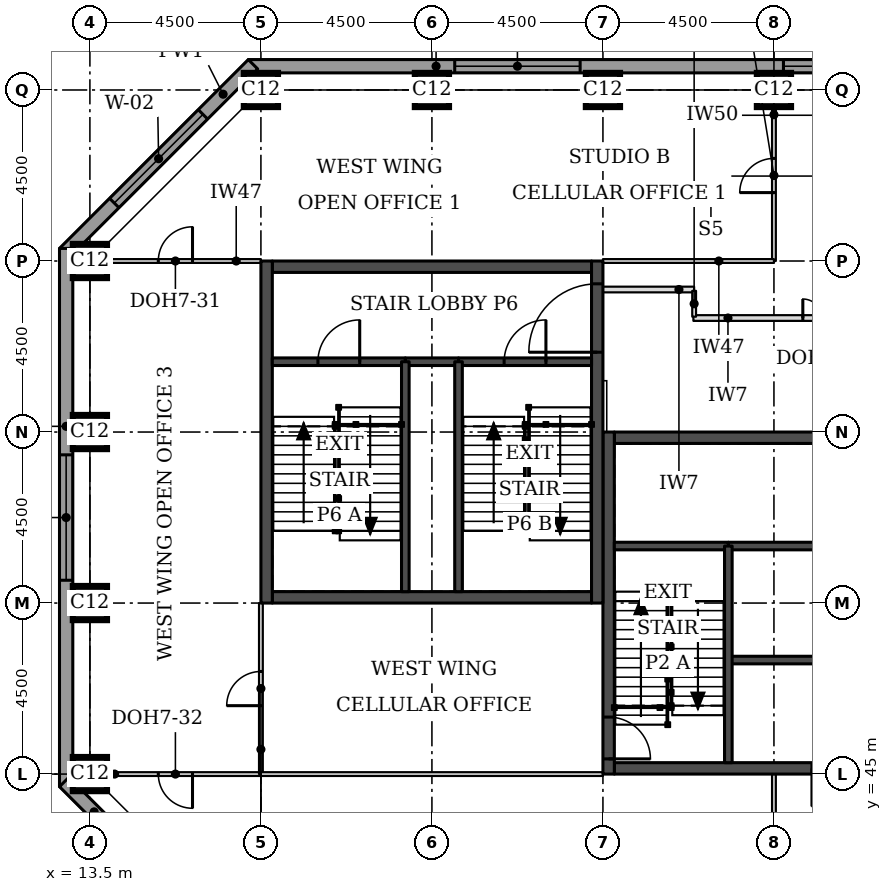
"""IFC4 building model, lengths in metres.
Left out: names, types, materials, properties, quantities, classifications, styles, units other than length and angle.
Written with IfcOpenShell. Run it as: python <this file> out.ifc"""

import sys

from ifc_helpers import new_model, si_unit, direction, frame, frame_2d, origin, origin_2d, place, context, subcontext, project, spatial, rectangle, extrude, element, fill, save


model = new_model("IFC4")
c1 = context("Model", 3, precision=1e-05, world=origin(), true_north=direction((0.0, 1.0)))
c2 = subcontext(c1, "Body", "Model", "MODEL_VIEW")
j1 = project(units=[si_unit("LENGTHUNIT", "METRE"), si_unit("PLANEANGLEUNIT", "RADIAN")], contexts=[c1])
p1 = place(None, origin())
s1 = spatial("IfcSite", under=j1, at=p1, CompositionType="ELEMENT")
p2 = place(p1, origin())
s2 = spatial("IfcBuilding", under=s1, at=p2, CompositionType="ELEMENT")
p3 = place(p2, frame((0.0, 0.0, 192.1)))
s3 = spatial("IfcBuildingStorey", under=s2, at=p3, CompositionType="ELEMENT", Elevation=192.1)
for number, where, z_axis, x_axis in (
    (1, (13.5, 45.0, 0.0), (0.0, 0.0, 1.0), (1.0, 0.0, 0.0)),
    (2, (13.5, 49.5, 0.0), (0.0, 0.0, 1.0), (1.0, 0.0, 0.0)),
    (3, (13.5, 54.0, 0.0), (0.0, 0.0, 1.0), (1.0, 0.0, 0.0)),
    (4, (13.5, 58.5, 0.0), (0.0, 0.0, 1.0), (1.0, 0.0, 0.0)),
    (5, (18.0, 63.0, 0.0), (0.0, 0.0, 1.0), (1.0, 0.0, 0.0)),
    (6, (22.5, 63.0, 0.0), (0.0, 0.0, 1.0), (1.0, 0.0, 0.0)),
    (7, (27.0, 63.0, 0.0), (0.0, 0.0, 1.0), (1.0, 0.0, 0.0)),
    (8, (31.5, 63.0, 0.0), (0.0, 0.0, 1.0), (1.0, 0.0, 0.0)),
):
    element("IfcColumn", number, at=place(p3, frame(where, z_axis=z_axis, x_axis=x_axis)), inside=s3, PredefinedType="COLUMN", context=c2, shape_type="SweptSolid", body=[
        extrude(rectangle(XDim=0.9, YDim=0.9, at=origin_2d()), origin(), (0.0, 0.0, 1.0), 3.7),
    ])
p4 = place(p3, frame((27.3, 45.15, 0.0), z_axis=(0.0, 0.0, 1.0), x_axis=(1.0, 0.0, 0.0)))
e9 = element("IfcWall", 9, at=p4, inside=s3, PredefinedType="SHEAR", context=c2, shape_type="SweptSolid", body=[
    extrude(rectangle(XDim=8.4, YDim=0.3, at=frame_2d((4.2, 0.0))), origin(), (0.0, 0.0, 1.0), 3.7),
])
p5 = place(p4, frame((5.2, 0.0, 0.0)))
e10 = element("IfcOpeningElement", 10, at=p5, cuts=e9, PredefinedType="OPENING", context=c2, shape_type="SweptSolid", body=[
    extrude(rectangle(XDim=1.0, YDim=2.1, at=frame_2d((0.5, 1.05))), frame((0.0, 0.16, 0.0), z_axis=(0.0, -1.0, 0.0), x_axis=(1.0, 0.0, 0.0)), (0.0, 0.0, 1.0), 0.32),
])
p6 = place(p3, frame((27.3, 53.85, 0.0), z_axis=(0.0, 0.0, 1.0), x_axis=(1.0, 0.0, 0.0)))
e11 = element("IfcWall", 11, at=p6, inside=s3, PredefinedType="SHEAR", context=c2, shape_type="SweptSolid", body=[
    extrude(rectangle(XDim=8.4, YDim=0.3, at=frame_2d((4.2, 0.0))), origin(), (0.0, 0.0, 1.0), 3.7),
])
p7 = place(p6, frame((6.4, 0.0, 0.0)))
e12 = element("IfcOpeningElement", 12, at=p7, cuts=e11, PredefinedType="OPENING", context=c2, shape_type="SweptSolid", body=[
    extrude(rectangle(XDim=1.1, YDim=2.1, at=frame_2d((0.55, 1.05))), frame((0.0, 0.16, 0.0), z_axis=(0.0, -1.0, 0.0), x_axis=(1.0, 0.0, 0.0)), (0.0, 0.0, 1.0), 0.32),
])
p8 = place(p3, frame((27.15, 45.0, 0.0), z_axis=(0.0, 0.0, 1.0), x_axis=(0.0, 1.0, 0.0)))
e13 = element("IfcWall", 13, at=p8, inside=s3, PredefinedType="SHEAR", context=c2, shape_type="SweptSolid", body=[
    extrude(rectangle(XDim=9.0, YDim=0.3, at=frame_2d((4.5, 0.0))), origin(), (0.0, 0.0, 1.0), 3.7),
])
p9 = place(p8, frame((0.4, 0.0, 0.0)))
e14 = element("IfcOpeningElement", 14, at=p9, cuts=e13, PredefinedType="OPENING", context=c2, shape_type="SweptSolid", body=[
    extrude(rectangle(XDim=1.1, YDim=2.1, at=frame_2d((0.55, 1.05))), frame((0.0, 0.16, 0.0), z_axis=(0.0, -1.0, 0.0), x_axis=(1.0, 0.0, 0.0)), (0.0, 0.0, 1.0), 0.32),
])
for number, where, z_axis, x_axis in (
    (15, (18.3, 49.65, 0.0), (0.0, 0.0, 1.0), (1.0, 0.0, 0.0)),
    (16, (18.3, 58.35, 0.0), (0.0, 0.0, 1.0), (1.0, 0.0, 0.0)),
):
    element("IfcWall", number, at=place(p3, frame(where, z_axis=z_axis, x_axis=x_axis)), inside=s3, PredefinedType="SHEAR", context=c2, shape_type="SweptSolid", body=[
        extrude(rectangle(XDim=8.4, YDim=0.3, at=frame_2d((4.2, 0.0))), origin(), (0.0, 0.0, 1.0), 3.7),
    ])
p10 = place(p3, frame((18.15, 49.5, 0.0), z_axis=(0.0, 0.0, 1.0), x_axis=(0.0, 1.0, 0.0)))
e17 = element("IfcWall", 17, at=p10, inside=s3, PredefinedType="SHEAR", context=c2, shape_type="SweptSolid", body=[
    extrude(rectangle(XDim=9.0, YDim=0.3, at=frame_2d((4.5, 0.0))), origin(), (0.0, 0.0, 1.0), 3.7),
])
p11 = place(p3, frame((26.85, 49.5, 0.0), z_axis=(0.0, 0.0, 1.0), x_axis=(0.0, 1.0, 0.0)))
e18 = element("IfcWall", 18, at=p11, inside=s3, PredefinedType="SHEAR", context=c2, shape_type="SweptSolid", body=[
    extrude(rectangle(XDim=9.0, YDim=0.3, at=frame_2d((4.5, 0.0))), origin(), (0.0, 0.0, 1.0), 3.7),
])
p12 = place(p11, frame((6.6, 0.0, 0.0)))
e19 = element("IfcOpeningElement", 19, at=p12, cuts=e18, PredefinedType="OPENING", context=c2, shape_type="SweptSolid", body=[
    extrude(rectangle(XDim=1.8, YDim=2.1, at=frame_2d((0.9, 1.05))), frame((0.0, 0.16, 0.0), z_axis=(0.0, -1.0, 0.0), x_axis=(1.0, 0.0, 0.0)), (0.0, 0.0, 1.0), 0.32),
])
p13 = place(p3, frame((35.55, 63.625, 0.0), z_axis=(0.0, 0.0, 1.0), x_axis=(-1.0, 0.0, 0.0)))
e20 = element("IfcWall", 20, at=p13, inside=s3, PredefinedType="STANDARD", context=c2, shape_type="SweptSolid", body=[
    extrude(rectangle(XDim=17.881, YDim=0.35, at=frame_2d((8.941, 0.0))), origin(), (0.0, 0.0, 1.0), 3.525),
])
p14 = place(p13, frame((0.5, 0.0, 0.9)))
e21 = element("IfcOpeningElement", 21, at=p14, cuts=e20, PredefinedType="OPENING", context=c2, shape_type="SweptSolid", body=[
    extrude(rectangle(XDim=3.3, YDim=1.9, at=frame_2d((1.65, 0.95))), frame((0.0, 0.185, 0.0), z_axis=(0.0, -1.0, 0.0), x_axis=(1.0, 0.0, 0.0)), (0.0, 0.0, 1.0), 0.37),
])
p15 = place(p13, frame((9.15, 0.0, 0.9)))
e22 = element("IfcOpeningElement", 22, at=p15, cuts=e20, PredefinedType="OPENING", context=c2, shape_type="SweptSolid", body=[
    extrude(rectangle(XDim=3.3, YDim=1.9, at=frame_2d((1.65, 0.95))), frame((0.0, 0.185, 0.0), z_axis=(0.0, -1.0, 0.0), x_axis=(1.0, 0.0, 0.0)), (0.0, 0.0, 1.0), 0.37),
])
p16 = place(p3, frame((17.792, 63.676, 0.0), z_axis=(0.0, 0.0, 1.0), x_axis=(-0.707106781187, -0.707106781187, 0.0)))
e23 = element("IfcWall", 23, at=p16, inside=s3, PredefinedType="STANDARD", context=c2, shape_type="SweptSolid", body=[
    extrude(rectangle(XDim=7.027, YDim=0.35, at=frame_2d((3.513, 0.0))), origin(), (0.0, 0.0, 1.0), 3.525),
])
p17 = place(p16, frame((1.863, 0.0, 0.9)))
e24 = element("IfcOpeningElement", 24, at=p17, cuts=e23, PredefinedType="OPENING", context=c2, shape_type="SweptSolid", body=[
    extrude(rectangle(XDim=3.3, YDim=1.9, at=frame_2d((1.65, 0.95))), frame((0.0, 0.185, 0.0), z_axis=(0.0, -1.0, 0.0), x_axis=(1.0, 0.0, 0.0)), (0.0, 0.0, 1.0), 0.37),
])
p18 = place(p3, frame((12.875, 58.831, 0.0), z_axis=(0.0, 0.0, 1.0), x_axis=(0.0, -1.0, 0.0)))
e25 = element("IfcWall", 25, at=p18, inside=s3, PredefinedType="STANDARD", context=c2, shape_type="SweptSolid", body=[
    extrude(rectangle(XDim=14.163, YDim=0.35, at=frame_2d((7.081, 0.0))), origin(), (0.0, 0.0, 1.0), 3.525),
])
p19 = place(p18, frame((5.431, 0.0, 0.9)))
e26 = element("IfcOpeningElement", 26, at=p19, cuts=e25, PredefinedType="OPENING", context=c2, shape_type="SweptSolid", body=[
    extrude(rectangle(XDim=3.3, YDim=1.9, at=frame_2d((1.65, 0.95))), frame((0.0, 0.185, 0.0), z_axis=(0.0, -1.0, 0.0), x_axis=(1.0, 0.0, 0.0)), (0.0, 0.0, 1.0), 0.37),
])
p20 = place(p3, frame((12.824, 44.792, 0.0), z_axis=(0.0, 0.0, 1.0), x_axis=(0.707106781187, -0.707106781187, 0.0)))
e27 = element("IfcWall", 27, at=p20, inside=s3, PredefinedType="STANDARD", context=c2, shape_type="SweptSolid", body=[
    extrude(rectangle(XDim=7.027, YDim=0.35, at=frame_2d((3.513, 0.0))), origin(), (0.0, 0.0, 1.0), 3.525),
])
p21 = place(p20, frame((1.863, 0.0, 0.9)))
e28 = element("IfcOpeningElement", 28, at=p21, cuts=e27, PredefinedType="OPENING", context=c2, shape_type="SweptSolid", body=[
    extrude(rectangle(XDim=3.3, YDim=1.9, at=frame_2d((1.65, 0.95))), frame((0.0, 0.185, 0.0), z_axis=(0.0, -1.0, 0.0), x_axis=(1.0, 0.0, 0.0)), (0.0, 0.0, 1.0), 0.37),
])
p22 = place(p3, frame((29.38, 57.0, 0.0), z_axis=(0.0, 0.0, 1.0), x_axis=(1.0, 0.0, 0.0)))
e29 = element("IfcWall", 29, at=p22, inside=s3, PredefinedType="PARTITIONING", context=c2, shape_type="SweptSolid", body=[
    extrude(rectangle(XDim=6.62, YDim=0.15, at=frame_2d((3.31, 0.0))), origin(), (0.0, 0.0, 1.0), 3.55),
])
p23 = place(p22, frame((2.88, 0.0, 0.0)))
e30 = element("IfcOpeningElement", 30, at=p23, cuts=e29, PredefinedType="OPENING", context=c2, shape_type="SweptSolid", body=[
    extrude(rectangle(XDim=1.0, YDim=2.1, at=frame_2d((0.5, 1.05))), frame((0.0, 0.085, 0.0), z_axis=(0.0, -1.0, 0.0), x_axis=(1.0, 0.0, 0.0)), (0.0, 0.0, 1.0), 0.17),
])
p24 = place(p3, frame((31.5, 63.0, 0.0), z_axis=(0.0, 0.0, 1.0), x_axis=(0.0, -1.0, 0.0)))
e31 = element("IfcWall", 31, at=p24, inside=s3, PredefinedType="PARTITIONING", context=c2, shape_type="SweptSolid", body=[
    extrude(rectangle(XDim=4.5, YDim=0.1, at=frame_2d((2.25, 0.0))), origin(), (0.0, 0.0, 1.0), 3.55),
])
p25 = place(p24, frame((1.8, 0.0, 0.0)))
e32 = element("IfcOpeningElement", 32, at=p25, cuts=e31, PredefinedType="OPENING", context=c2, shape_type="SweptSolid", body=[
    extrude(rectangle(XDim=0.9, YDim=2.1, at=frame_2d((0.45, 1.05))), frame((0.0, 0.06, 0.0), z_axis=(0.0, -1.0, 0.0), x_axis=(1.0, 0.0, 0.0)), (0.0, 0.0, 1.0), 0.12),
])
p26 = place(p3, frame((31.5, 58.5, 0.0), z_axis=(0.0, 0.0, 1.0), x_axis=(-1.0, 0.0, 0.0)))
e33 = element("IfcWall", 33, at=p26, inside=s3, PredefinedType="PARTITIONING", context=c2, shape_type="SweptSolid", body=[
    extrude(rectangle(XDim=4.5, YDim=0.1, at=frame_2d((2.25, 0.0))), origin(), (0.0, 0.0, 1.0), 2.55),
])
p27 = place(p3, frame((13.5, 58.5, 0.0), z_axis=(0.0, 0.0, 1.0), x_axis=(1.0, 0.0, 0.0)))
e34 = element("IfcWall", 34, at=p27, inside=s3, PredefinedType="PARTITIONING", context=c2, shape_type="SweptSolid", body=[
    extrude(rectangle(XDim=4.5, YDim=0.1, at=frame_2d((2.25, 0.0))), origin(), (0.0, 0.0, 1.0), 2.55),
])
p28 = place(p27, frame((1.8, 0.0, 0.0)))
e35 = element("IfcOpeningElement", 35, at=p28, cuts=e34, PredefinedType="OPENING", context=c2, shape_type="SweptSolid", body=[
    extrude(rectangle(XDim=0.9, YDim=2.1, at=frame_2d((0.45, 1.05))), frame((0.0, 0.06, 0.0), z_axis=(0.0, -1.0, 0.0), x_axis=(1.0, 0.0, 0.0)), (0.0, 0.0, 1.0), 0.12),
])
p29 = place(p3, frame((18.0, 45.0, 0.0), z_axis=(0.0, 0.0, 1.0), x_axis=(-1.0, 0.0, 0.0)))
e36 = element("IfcWall", 36, at=p29, inside=s3, PredefinedType="PARTITIONING", context=c2, shape_type="SweptSolid", body=[
    extrude(rectangle(XDim=4.5, YDim=0.1, at=frame_2d((2.25, 0.0))), origin(), (0.0, 0.0, 1.0), 2.55),
])
p30 = place(p29, frame((1.8, 0.0, 0.0)))
e37 = element("IfcOpeningElement", 37, at=p30, cuts=e36, PredefinedType="OPENING", context=c2, shape_type="SweptSolid", body=[
    extrude(rectangle(XDim=0.9, YDim=2.1, at=frame_2d((0.45, 1.05))), frame((0.0, 0.06, 0.0), z_axis=(0.0, -1.0, 0.0), x_axis=(1.0, 0.0, 0.0)), (0.0, 0.0, 1.0), 0.12),
])
p31 = place(p3, frame((18.0, 49.5, 0.0), z_axis=(0.0, 0.0, 1.0), x_axis=(0.0, -1.0, 0.0)))
e38 = element("IfcWall", 38, at=p31, inside=s3, PredefinedType="PARTITIONING", context=c2, shape_type="SweptSolid", body=[
    extrude(rectangle(XDim=4.5, YDim=0.1, at=frame_2d((2.25, 0.0))), origin(), (0.0, 0.0, 1.0), 3.55),
])
p32 = place(p31, frame((1.8, 0.0, 0.0)))
e39 = element("IfcOpeningElement", 39, at=p32, cuts=e38, PredefinedType="OPENING", context=c2, shape_type="SweptSolid", body=[
    extrude(rectangle(XDim=0.9, YDim=2.1, at=frame_2d((0.45, 1.05))), frame((0.0, 0.06, 0.0), z_axis=(0.0, -1.0, 0.0), x_axis=(1.0, 0.0, 0.0)), (0.0, 0.0, 1.0), 0.12),
])
p33 = place(p3, frame((18.0, 45.0, 0.0), z_axis=(0.0, 0.0, 1.0), x_axis=(1.0, 0.0, 0.0)))
e40 = element("IfcWall", 40, at=p33, inside=s3, PredefinedType="PARTITIONING", context=c2, shape_type="SweptSolid", body=[
    extrude(rectangle(XDim=9.0, YDim=0.1, at=frame_2d((4.5, 0.0))), origin(), (0.0, 0.0, 1.0), 2.55),
])
p34 = place(p3, frame((31.5, 45.0, 0.0), z_axis=(0.0, 0.0, 1.0), x_axis=(0.0, -1.0, 0.0)))
e41 = element("IfcWall", 41, at=p34, inside=s3, PredefinedType="PARTITIONING", context=c2, shape_type="SweptSolid", body=[
    extrude(rectangle(XDim=4.5, YDim=0.1, at=frame_2d((2.25, 0.0))), origin(), (0.0, 0.0, 1.0), 3.55),
])
p35 = place(p34, frame((1.8, 0.0, 0.0)))
e42 = element("IfcOpeningElement", 42, at=p35, cuts=e41, PredefinedType="OPENING", context=c2, shape_type="SweptSolid", body=[
    extrude(rectangle(XDim=0.9, YDim=2.1, at=frame_2d((0.45, 1.05))), frame((0.0, 0.06, 0.0), z_axis=(0.0, -1.0, 0.0), x_axis=(1.0, 0.0, 0.0)), (0.0, 0.0, 1.0), 0.12),
])
p36 = place(p3, frame((27.0, 57.75, 0.0), z_axis=(0.0, 0.0, 1.0), x_axis=(1.0, 0.0, 0.0)))
e43 = element("IfcWall", 43, at=p36, inside=s3, PredefinedType="PARTITIONING", context=c2, shape_type="SweptSolid", body=[
    extrude(rectangle(XDim=2.4, YDim=0.15, at=frame_2d((1.2, 0.0))), origin(), (0.0, 0.0, 1.0), 3.55),
])
p37 = place(p3, frame((29.4, 57.715, 0.0), z_axis=(0.0, 0.0, 1.0), x_axis=(0.0, -1.0, 0.0)))
e44 = element("IfcWall", 44, at=p37, inside=s3, PredefinedType="PARTITIONING", context=c2, shape_type="SweptSolid", body=[
    extrude(rectangle(XDim=0.68, YDim=0.1, at=frame_2d((0.34, 0.0))), origin(), (0.0, 0.0, 1.0), 3.55),
])
p38 = place(p3, frame((30.3, 48.0, 0.0), z_axis=(0.0, 0.0, 1.0), x_axis=(1.0, 0.0, 0.0)))
e45 = element("IfcWall", 45, at=p38, inside=s3, PredefinedType="SOLIDWALL", context=c2, shape_type="SweptSolid", body=[
    extrude(rectangle(XDim=2.4, YDim=0.2, at=frame_2d((1.2, 0.0))), origin(), (0.0, 0.0, 1.0), 3.55),
])
p39 = place(p3, frame((30.3, 51.0, 0.0), z_axis=(0.0, 0.0, 1.0), x_axis=(1.0, 0.0, 0.0)))
e46 = element("IfcWall", 46, at=p39, inside=s3, PredefinedType="SOLIDWALL", context=c2, shape_type="SweptSolid", body=[
    extrude(rectangle(XDim=2.4, YDim=0.2, at=frame_2d((1.2, 0.0))), origin(), (0.0, 0.0, 1.0), 3.7),
])
p40 = place(p3, frame((27.3, 51.0, 0.0), z_axis=(0.0, 0.0, 1.0), x_axis=(1.0, 0.0, 0.0)))
e47 = element("IfcWall", 47, at=p40, inside=s3, PredefinedType="SOLIDWALL", context=c2, shape_type="SweptSolid", body=[
    extrude(rectangle(XDim=3.0, YDim=0.2, at=frame_2d((1.5, 0.0))), origin(), (0.0, 0.0, 1.0), 3.55),
])
p41 = place(p3, frame((30.3, 45.3, 0.0), z_axis=(0.0, 0.0, 1.0), x_axis=(0.0, 1.0, 0.0)))
e48 = element("IfcWall", 48, at=p41, inside=s3, PredefinedType="SOLIDWALL", context=c2, shape_type="SweptSolid", body=[
    extrude(rectangle(XDim=5.7, YDim=0.2, at=frame_2d((2.85, 0.0))), origin(), (0.0, 0.0, 1.0), 3.55),
])
p42 = place(p3, frame((21.8, 55.85, 0.0), z_axis=(0.0, 0.0, 1.0), x_axis=(1.0, 0.0, 0.0)))
e49 = element("IfcWall", 49, at=p42, inside=s3, PredefinedType="SOLIDWALL", context=c2, shape_type="SweptSolid", body=[
    extrude(rectangle(XDim=1.4, YDim=0.2, at=frame_2d((0.7, 0.0))), origin(), (0.0, 0.0, 1.0), 3.55),
])
p43 = place(p3, frame((18.3, 55.85, 0.0), z_axis=(0.0, 0.0, 1.0), x_axis=(1.0, 0.0, 0.0)))
e50 = element("IfcWall", 50, at=p43, inside=s3, PredefinedType="SOLIDWALL", context=c2, shape_type="SweptSolid", body=[
    extrude(rectangle(XDim=3.5, YDim=0.2, at=frame_2d((1.75, 0.0))), origin(), (0.0, 0.0, 1.0), 3.55),
])
p44 = place(p43, frame((1.2, 0.0, 0.0)))
e51 = element("IfcOpeningElement", 51, at=p44, cuts=e50, PredefinedType="OPENING", context=c2, shape_type="SweptSolid", body=[
    extrude(rectangle(XDim=1.1, YDim=2.1, at=frame_2d((0.55, 1.05))), frame((0.0, 0.11, 0.0), z_axis=(0.0, -1.0, 0.0), x_axis=(1.0, 0.0, 0.0)), (0.0, 0.0, 1.0), 0.22),
])
p45 = place(p3, frame((23.2, 55.85, 0.0), z_axis=(0.0, 0.0, 1.0), x_axis=(1.0, 0.0, 0.0)))
e52 = element("IfcWall", 52, at=p45, inside=s3, PredefinedType="SOLIDWALL", context=c2, shape_type="SweptSolid", body=[
    extrude(rectangle(XDim=3.5, YDim=0.2, at=frame_2d((1.75, 0.0))), origin(), (0.0, 0.0, 1.0), 3.55),
])
p46 = place(p45, frame((1.2, 0.0, 0.0)))
e53 = element("IfcOpeningElement", 53, at=p46, cuts=e52, PredefinedType="OPENING", context=c2, shape_type="SweptSolid", body=[
    extrude(rectangle(XDim=1.1, YDim=2.1, at=frame_2d((0.55, 1.05))), frame((0.0, 0.11, 0.0), z_axis=(0.0, -1.0, 0.0), x_axis=(1.0, 0.0, 0.0)), (0.0, 0.0, 1.0), 0.22),
])
for number, where, z_axis, x_axis in (
    (54, (21.8, 49.8, 0.0), (0.0, 0.0, 1.0), (0.0, 1.0, 0.0)),
    (55, (23.2, 49.8, 0.0), (0.0, 0.0, 1.0), (0.0, 1.0, 0.0)),
):
    element("IfcWall", number, at=place(p3, frame(where, z_axis=z_axis, x_axis=x_axis)), inside=s3, PredefinedType="SOLIDWALL", context=c2, shape_type="SweptSolid", body=[
        extrude(rectangle(XDim=6.05, YDim=0.2, at=frame_2d((3.025, 0.0))), origin(), (0.0, 0.0, 1.0), 3.55),
    ])
p47 = place(p14, origin())
e56 = element("IfcWindow", 56, at=p47, inside=s3, PartitioningType="SINGLE_PANEL", PredefinedType="WINDOW", context=c2, shape_type="SweptSolid", body=[
    extrude(rectangle(XDim=3.3, YDim=1.9, at=frame_2d((1.65, 0.95))), frame((0.0, 0.085, 0.0), z_axis=(0.0, -1.0, 0.0), x_axis=(1.0, 0.0, 0.0)), (0.0, 0.0, 1.0), 0.06),
])
fill(e21, e56)
p48 = place(p15, origin())
e57 = element("IfcWindow", 57, at=p48, inside=s3, PartitioningType="SINGLE_PANEL", PredefinedType="WINDOW", context=c2, shape_type="SweptSolid", body=[
    extrude(rectangle(XDim=3.3, YDim=1.9, at=frame_2d((1.65, 0.95))), frame((0.0, 0.085, 0.0), z_axis=(0.0, -1.0, 0.0), x_axis=(1.0, 0.0, 0.0)), (0.0, 0.0, 1.0), 0.06),
])
fill(e22, e57)
p49 = place(p17, origin())
e58 = element("IfcWindow", 58, at=p49, inside=s3, PartitioningType="SINGLE_PANEL", PredefinedType="WINDOW", context=c2, shape_type="SweptSolid", body=[
    extrude(rectangle(XDim=3.3, YDim=1.9, at=frame_2d((1.65, 0.95))), frame((0.0, 0.085, 0.0), z_axis=(0.0, -1.0, 0.0), x_axis=(1.0, 0.0, 0.0)), (0.0, 0.0, 1.0), 0.06),
])
fill(e24, e58)
p50 = place(p19, origin())
e59 = element("IfcWindow", 59, at=p50, inside=s3, PartitioningType="SINGLE_PANEL", PredefinedType="WINDOW", context=c2, shape_type="SweptSolid", body=[
    extrude(rectangle(XDim=3.3, YDim=1.9, at=frame_2d((1.65, 0.95))), frame((0.0, 0.085, 0.0), z_axis=(0.0, -1.0, 0.0), x_axis=(1.0, 0.0, 0.0)), (0.0, 0.0, 1.0), 0.06),
])
fill(e26, e59)
p51 = place(p23, origin())
e60 = element("IfcDoor", 60, at=p51, inside=s3, OperationType="DOUBLE_DOOR_SINGLE_SWING", PredefinedType="DOOR", context=c2, shape_type="SweptSolid", body=[
    extrude(rectangle(XDim=1.0, YDim=2.1, at=frame_2d((0.5, 1.05))), frame((0.0, 0.025, 0.0), z_axis=(0.0, -1.0, 0.0), x_axis=(1.0, 0.0, 0.0)), (0.0, 0.0, 1.0), 0.05),
])
fill(e30, e60)
p52 = place(p25, frame((0.9, 0.0, 0.0), z_axis=(0.0, 0.0, 1.0), x_axis=(-1.0, 0.0, 0.0)))
e61 = element("IfcDoor", 61, at=p52, inside=s3, OperationType="SINGLE_SWING_LEFT", PredefinedType="DOOR", context=c2, shape_type="SweptSolid", body=[
    extrude(rectangle(XDim=0.9, YDim=2.1, at=frame_2d((0.45, 1.05))), frame((0.0, 0.025, 0.0), z_axis=(0.0, -1.0, 0.0), x_axis=(1.0, 0.0, 0.0)), (0.0, 0.0, 1.0), 0.05),
])
fill(e32, e61)
p53 = place(p28, origin())
e62 = element("IfcDoor", 62, at=p53, inside=s3, OperationType="SINGLE_SWING_RIGHT", PredefinedType="DOOR", context=c2, shape_type="SweptSolid", body=[
    extrude(rectangle(XDim=0.9, YDim=2.1, at=frame_2d((0.45, 1.05))), frame((0.0, 0.025, 0.0), z_axis=(0.0, -1.0, 0.0), x_axis=(1.0, 0.0, 0.0)), (0.0, 0.0, 1.0), 0.05),
])
fill(e35, e62)
p54 = place(p30, origin())
e63 = element("IfcDoor", 63, at=p54, inside=s3, OperationType="SINGLE_SWING_LEFT", PredefinedType="DOOR", context=c2, shape_type="SweptSolid", body=[
    extrude(rectangle(XDim=0.9, YDim=2.1, at=frame_2d((0.45, 1.05))), frame((0.0, 0.025, 0.0), z_axis=(0.0, -1.0, 0.0), x_axis=(1.0, 0.0, 0.0)), (0.0, 0.0, 1.0), 0.05),
])
fill(e37, e63)
p55 = place(p32, frame((0.9, 0.0, 0.0), z_axis=(0.0, 0.0, 1.0), x_axis=(-1.0, 0.0, 0.0)))
e64 = element("IfcDoor", 64, at=p55, inside=s3, OperationType="SINGLE_SWING_LEFT", PredefinedType="DOOR", context=c2, shape_type="SweptSolid", body=[
    extrude(rectangle(XDim=0.9, YDim=2.1, at=frame_2d((0.45, 1.05))), frame((0.0, 0.025, 0.0), z_axis=(0.0, -1.0, 0.0), x_axis=(1.0, 0.0, 0.0)), (0.0, 0.0, 1.0), 0.05),
])
fill(e39, e64)
p56 = place(p9, frame((1.1, 0.0, 0.0), z_axis=(0.0, 0.0, 1.0), x_axis=(-1.0, 0.0, 0.0)))
e65 = element("IfcDoor", 65, at=p56, inside=s3, OperationType="SINGLE_SWING_RIGHT", PredefinedType="DOOR", context=c2, shape_type="SweptSolid", body=[
    extrude(rectangle(XDim=1.1, YDim=2.1, at=frame_2d((0.55, 1.05))), frame((0.0, 0.025, 0.0), z_axis=(0.0, -1.0, 0.0), x_axis=(1.0, 0.0, 0.0)), (0.0, 0.0, 1.0), 0.05),
])
fill(e14, e65)
p57 = place(p44, origin())
e66 = element("IfcDoor", 66, at=p57, inside=s3, OperationType="SINGLE_SWING_RIGHT", PredefinedType="DOOR", context=c2, shape_type="SweptSolid", body=[
    extrude(rectangle(XDim=1.1, YDim=2.1, at=frame_2d((0.55, 1.05))), frame((0.0, 0.025, 0.0), z_axis=(0.0, -1.0, 0.0), x_axis=(1.0, 0.0, 0.0)), (0.0, 0.0, 1.0), 0.05),
])
fill(e51, e66)
p58 = place(p46, origin())
e67 = element("IfcDoor", 67, at=p58, inside=s3, OperationType="SINGLE_SWING_RIGHT", PredefinedType="DOOR", context=c2, shape_type="SweptSolid", body=[
    extrude(rectangle(XDim=1.1, YDim=2.1, at=frame_2d((0.55, 1.05))), frame((0.0, 0.025, 0.0), z_axis=(0.0, -1.0, 0.0), x_axis=(1.0, 0.0, 0.0)), (0.0, 0.0, 1.0), 0.05),
])
fill(e53, e67)
p59 = place(p12, origin())
e68 = element("IfcDoor", 68, at=p59, inside=s3, OperationType="SINGLE_SWING_LEFT", PredefinedType="DOOR", context=c2, shape_type="SweptSolid", body=[
    extrude(rectangle(XDim=1.8, YDim=2.1, at=frame_2d((0.9, 1.05))), frame((0.0, 0.025, 0.0), z_axis=(0.0, -1.0, 0.0), x_axis=(1.0, 0.0, 0.0)), (0.0, 0.0, 1.0), 0.05),
])
fill(e19, e68)
save(model, sys.argv[1])
